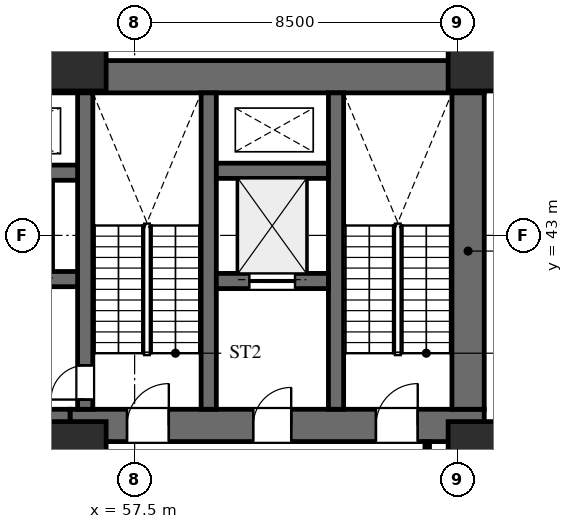
"""IFC4 building model, lengths in metres.
Left out: names, types, materials, properties, quantities, classifications, styles, units other than length and angle.
Written with IfcOpenShell. Run it as: python <this file> out.ifc"""

import sys

from ifc_helpers import new_model, si_unit, direction, frame, frame_2d, origin, origin_2d, place, context, subcontext, project, spatial, rectangle, extrude, element, fill, save


model = new_model("IFC4")
c1 = context("Model", 3, precision=1e-05, world=origin(), true_north=direction((0.0, 1.0)))
c2 = subcontext(c1, "Body", "Model", "MODEL_VIEW")
j1 = project(units=[si_unit("LENGTHUNIT", "METRE"), si_unit("PLANEANGLEUNIT", "RADIAN")], contexts=[c1])
p1 = place(None, origin())
s1 = spatial("IfcSite", under=j1, at=p1, CompositionType="ELEMENT")
p2 = place(p1, origin())
s2 = spatial("IfcBuilding", under=s1, at=p2, CompositionType="ELEMENT")
p3 = place(p2, frame((0.0, 0.0, 10.8)))
s3 = spatial("IfcBuildingStorey", under=s2, at=p3, CompositionType="ELEMENT", Elevation=10.8)
p4 = place(p3, frame((22.9, 47.175, 0.0), z_axis=(0.0, 0.0, 1.0), x_axis=(1.0, 0.0, 0.0)))
e1 = element("IfcWall", 1, at=p4, inside=s3, PredefinedType="SHEAR", context=c2, shape_type="SweptSolid", body=[
    extrude(rectangle(XDim=43.8, YDim=0.85, at=frame_2d((21.9, 0.0))), origin(), (0.0, 0.0, 1.0), 4.5),
])
p5 = place(p3, frame((55.8, 38.0, 0.0), z_axis=(0.0, 0.0, 1.0), x_axis=(1.0, 0.0, 0.0)))
e2 = element("IfcWall", 2, at=p5, inside=s3, PredefinedType="SHEAR", context=c2, shape_type="SweptSolid", body=[
    extrude(rectangle(XDim=10.9, YDim=0.85, at=frame_2d((5.45, 0.0))), origin(), (0.0, 0.0, 1.0), 4.5),
])
p6 = place(p5, frame((1.5, 0.0, 0.0)))
e3 = element("IfcOpeningElement", 3, at=p6, cuts=e2, PredefinedType="OPENING", context=c2, shape_type="SweptSolid", body=[
    extrude(rectangle(XDim=1.1, YDim=2.2, at=frame_2d((0.55, 1.1))), frame((0.0, 0.435, 0.0), z_axis=(0.0, -1.0, 0.0), x_axis=(1.0, 0.0, 0.0)), (0.0, 0.0, 1.0), 0.87),
])
p7 = place(p5, frame((4.82, 0.0, 0.0)))
e4 = element("IfcOpeningElement", 4, at=p7, cuts=e2, PredefinedType="OPENING", context=c2, shape_type="SweptSolid", body=[
    extrude(rectangle(XDim=1.0, YDim=2.15, at=frame_2d((0.5, 1.075))), frame((0.0, 0.435, 0.0), z_axis=(0.0, -1.0, 0.0), x_axis=(1.0, 0.0, 0.0)), (0.0, 0.0, 1.0), 0.87),
])
p8 = place(p5, frame((8.05, 0.0, 0.0)))
e5 = element("IfcOpeningElement", 5, at=p8, cuts=e2, PredefinedType="OPENING", context=c2, shape_type="SweptSolid", body=[
    extrude(rectangle(XDim=1.1, YDim=2.2, at=frame_2d((0.55, 1.1))), frame((0.0, 0.435, 0.0), z_axis=(0.0, -1.0, 0.0), x_axis=(1.0, 0.0, 0.0)), (0.0, 0.0, 1.0), 0.87),
])
p9 = place(p3, frame((66.275, 38.425, 0.0), z_axis=(0.0, 0.0, 1.0), x_axis=(0.0, 1.0, 0.0)))
e6 = element("IfcWall", 6, at=p9, inside=s3, PredefinedType="SHEAR", context=c2, shape_type="SweptSolid", body=[
    extrude(rectangle(XDim=8.325, YDim=0.85, at=frame_2d((4.163, 0.0))), origin(), (0.0, 0.0, 1.0), 4.5),
])
for number, where, z_axis, x_axis in (
    (7, (62.8, 38.425, 0.0), (0.0, 0.0, 1.0), (0.0, 1.0, 0.0)),
    (8, (59.45, 38.425, 0.0), (0.0, 0.0, 1.0), (0.0, 1.0, 0.0)),
):
    element("IfcWall", number, at=place(p3, frame(where, z_axis=z_axis, x_axis=x_axis)), inside=s3, PredefinedType="SHEAR", context=c2, shape_type="SweptSolid", body=[
        extrude(rectangle(XDim=8.325, YDim=0.4, at=frame_2d((4.163, 0.0))), origin(), (0.0, 0.0, 1.0), 4.5),
    ])
p10 = place(p3, frame((56.2, 38.425, 0.0), z_axis=(0.0, 0.0, 1.0), x_axis=(0.0, 1.0, 0.0)))
e9 = element("IfcWall", 9, at=p10, inside=s3, PredefinedType="SHEAR", context=c2, shape_type="SweptSolid", body=[
    extrude(rectangle(XDim=8.325, YDim=0.4, at=frame_2d((4.163, 0.0))), origin(), (0.0, 0.0, 1.0), 4.5),
])
p11 = place(p10, frame((0.255, 0.0, 0.0)))
e10 = element("IfcOpeningElement", 10, at=p11, cuts=e9, PredefinedType="OPENING", context=c2, shape_type="SweptSolid", body=[
    extrude(rectangle(XDim=0.9, YDim=2.15, at=frame_2d((0.45, 1.075))), frame((0.0, 0.21, 0.0), z_axis=(0.0, -1.0, 0.0), x_axis=(1.0, 0.0, 0.0)), (0.0, 0.0, 1.0), 0.42),
])
p12 = place(p3, frame((59.65, 41.8, 0.0), z_axis=(0.0, 0.0, 1.0), x_axis=(1.0, 0.0, 0.0)))
e11 = element("IfcWall", 11, at=p12, inside=s3, PredefinedType="SHEAR", context=c2, shape_type="SweptSolid", body=[
    extrude(rectangle(XDim=2.95, YDim=0.4, at=frame_2d((1.475, 0.0))), origin(), (0.0, 0.0, 1.0), 4.5),
])
p13 = place(p12, frame((0.87, 0.0, 0.0)))
e12 = element("IfcOpeningElement", 12, at=p13, cuts=e11, PredefinedType="OPENING", context=c2, shape_type="SweptSolid", body=[
    extrude(rectangle(XDim=1.2, YDim=2.2, at=frame_2d((0.6, 1.1))), frame((0.0, 0.21, 0.0), z_axis=(0.0, -1.0, 0.0), x_axis=(1.0, 0.0, 0.0)), (0.0, 0.0, 1.0), 0.42),
])
p14 = place(p3, frame((59.65, 44.7, 0.0), z_axis=(0.0, 0.0, 1.0), x_axis=(1.0, 0.0, 0.0)))
e13 = element("IfcWall", 13, at=p14, inside=s3, PredefinedType="SHEAR", context=c2, shape_type="SweptSolid", body=[
    extrude(rectangle(XDim=2.95, YDim=0.4, at=frame_2d((1.475, 0.0))), origin(), (0.0, 0.0, 1.0), 4.5),
])
p15 = place(p3, frame((50.8, 38.0, 0.0), z_axis=(0.0, 0.0, 1.0), x_axis=(1.0, 0.0, 0.0)))
e14 = element("IfcWall", 14, at=p15, inside=s3, PredefinedType="SHEAR", context=c2, shape_type="SweptSolid", body=[
    extrude(rectangle(XDim=5.0, YDim=0.85, at=frame_2d((2.5, 0.0))), origin(), (0.0, 0.0, 1.0), 4.5),
])
p16 = place(p15, frame((2.0, 0.0, 0.0)))
e15 = element("IfcOpeningElement", 15, at=p16, cuts=e14, PredefinedType="OPENING", context=c2, shape_type="SweptSolid", body=[
    extrude(rectangle(XDim=1.2, YDim=2.2, at=frame_2d((0.6, 1.1))), frame((0.0, 0.435, 0.0), z_axis=(0.0, -1.0, 0.0), x_axis=(1.0, 0.0, 0.0)), (0.0, 0.0, 1.0), 0.87),
])
p17 = place(p3, frame((51.25, 41.85, 0.0), z_axis=(0.0, 0.0, 1.0), x_axis=(1.0, 0.0, 0.0)))
e16 = element("IfcWall", 16, at=p17, inside=s3, PredefinedType="SHEAR", context=c2, shape_type="SweptSolid", body=[
    extrude(rectangle(XDim=4.75, YDim=0.4, at=frame_2d((2.375, 0.0))), origin(), (0.0, 0.0, 1.0), 4.5),
])
p18 = place(p17, frame((0.5, 0.0, 0.0)))
e17 = element("IfcOpeningElement", 17, at=p18, cuts=e16, PredefinedType="OPENING", context=c2, shape_type="SweptSolid", body=[
    extrude(rectangle(XDim=1.2, YDim=2.2, at=frame_2d((0.6, 1.1))), frame((0.0, 0.21, 0.0), z_axis=(0.0, -1.0, 0.0), x_axis=(1.0, 0.0, 0.0)), (0.0, 0.0, 1.0), 0.42),
])
p19 = place(p17, frame((2.6, 0.0, 0.0)))
e18 = element("IfcOpeningElement", 18, at=p19, cuts=e16, PredefinedType="OPENING", context=c2, shape_type="SweptSolid", body=[
    extrude(rectangle(XDim=1.2, YDim=2.2, at=frame_2d((0.6, 1.1))), frame((0.0, 0.21, 0.0), z_axis=(0.0, -1.0, 0.0), x_axis=(1.0, 0.0, 0.0)), (0.0, 0.0, 1.0), 0.42),
])
p20 = place(p3, frame((51.25, 44.65, 0.0), z_axis=(0.0, 0.0, 1.0), x_axis=(1.0, 0.0, 0.0)))
e19 = element("IfcWall", 19, at=p20, inside=s3, PredefinedType="SHEAR", context=c2, shape_type="SweptSolid", body=[
    extrude(rectangle(XDim=4.75, YDim=0.4, at=frame_2d((2.375, 0.0))), origin(), (0.0, 0.0, 1.0), 4.5),
])
for number, where, z_axis, x_axis in (
    (20, (66.5, 47.55, 0.0), (0.0, 0.0, 1.0), (1.0, 0.0, 0.0)),
    (21, (56.0, 47.55, 0.0), (0.0, 0.0, 1.0), (1.0, 0.0, 0.0)),
    (22, (66.5, 37.35, 0.0), (0.0, 0.0, 1.0), (1.0, 0.0, 0.0)),
    (23, (56.0, 37.35, 0.0), (0.0, 0.0, 1.0), (1.0, 0.0, 0.0)),
):
    element("IfcColumn", number, at=place(p3, frame(where, z_axis=z_axis, x_axis=x_axis)), inside=s3, PredefinedType="COLUMN", context=c2, shape_type="SweptSolid", body=[
        extrude(rectangle(XDim=1.5, YDim=1.5, at=origin_2d()), origin(), (0.0, 0.0, 1.0), 4.5),
    ])
p21 = place(p3, frame((65.2, 34.4, 0.0), z_axis=(0.0, 0.0, 1.0), x_axis=(0.0, 1.0, 0.0)))
e24 = element("IfcWall", 24, at=p21, inside=s3, PredefinedType="PARTITIONING", context=c2, shape_type="SweptSolid", body=[
    extrude(rectangle(XDim=3.167, YDim=0.12, at=frame_2d((1.583, 0.0))), origin(), (0.0, 0.0, 1.0), 3.282),
])
p22 = place(p6, origin())
e25 = element("IfcDoor", 25, at=p22, inside=s3, OperationType="SINGLE_SWING_RIGHT", PredefinedType="DOOR", context=c2, shape_type="SweptSolid", body=[
    extrude(rectangle(XDim=1.1, YDim=2.2, at=frame_2d((0.55, 1.1))), frame((0.0, 0.025, 0.0), z_axis=(0.0, -1.0, 0.0), x_axis=(1.0, 0.0, 0.0)), (0.0, 0.0, 1.0), 0.05),
])
fill(e3, e25)
p23 = place(p7, origin())
e26 = element("IfcDoor", 26, at=p23, inside=s3, OperationType="SINGLE_SWING_RIGHT", PredefinedType="DOOR", context=c2, shape_type="SweptSolid", body=[
    extrude(rectangle(XDim=1.0, YDim=2.15, at=frame_2d((0.5, 1.075))), frame((0.0, 0.025, 0.0), z_axis=(0.0, -1.0, 0.0), x_axis=(1.0, 0.0, 0.0)), (0.0, 0.0, 1.0), 0.05),
])
fill(e4, e26)
p24 = place(p8, origin())
e27 = element("IfcDoor", 27, at=p24, inside=s3, OperationType="SINGLE_SWING_RIGHT", PredefinedType="DOOR", context=c2, shape_type="SweptSolid", body=[
    extrude(rectangle(XDim=1.1, YDim=2.2, at=frame_2d((0.55, 1.1))), frame((0.0, 0.025, 0.0), z_axis=(0.0, -1.0, 0.0), x_axis=(1.0, 0.0, 0.0)), (0.0, 0.0, 1.0), 0.05),
])
fill(e5, e27)
p25 = place(p11, origin())
e28 = element("IfcDoor", 28, at=p25, inside=s3, OperationType="SINGLE_SWING_LEFT", PredefinedType="DOOR", context=c2, shape_type="SweptSolid", body=[
    extrude(rectangle(XDim=0.9, YDim=2.15, at=frame_2d((0.45, 1.075))), frame((0.0, 0.025, 0.0), z_axis=(0.0, -1.0, 0.0), x_axis=(1.0, 0.0, 0.0)), (0.0, 0.0, 1.0), 0.05),
])
fill(e10, e28)
p26 = place(p13, origin())
e29 = element("IfcDoor", 29, at=p26, inside=s3, OperationType="DOUBLE_DOOR_SLIDING", PredefinedType="DOOR", context=c2, shape_type="SweptSolid", body=[
    extrude(rectangle(XDim=1.2, YDim=2.2, at=frame_2d((0.6, 1.1))), frame((0.0, 0.025, 0.0), z_axis=(0.0, -1.0, 0.0), x_axis=(1.0, 0.0, 0.0)), (0.0, 0.0, 1.0), 0.05),
])
fill(e12, e29)
save(model, sys.argv[1])
